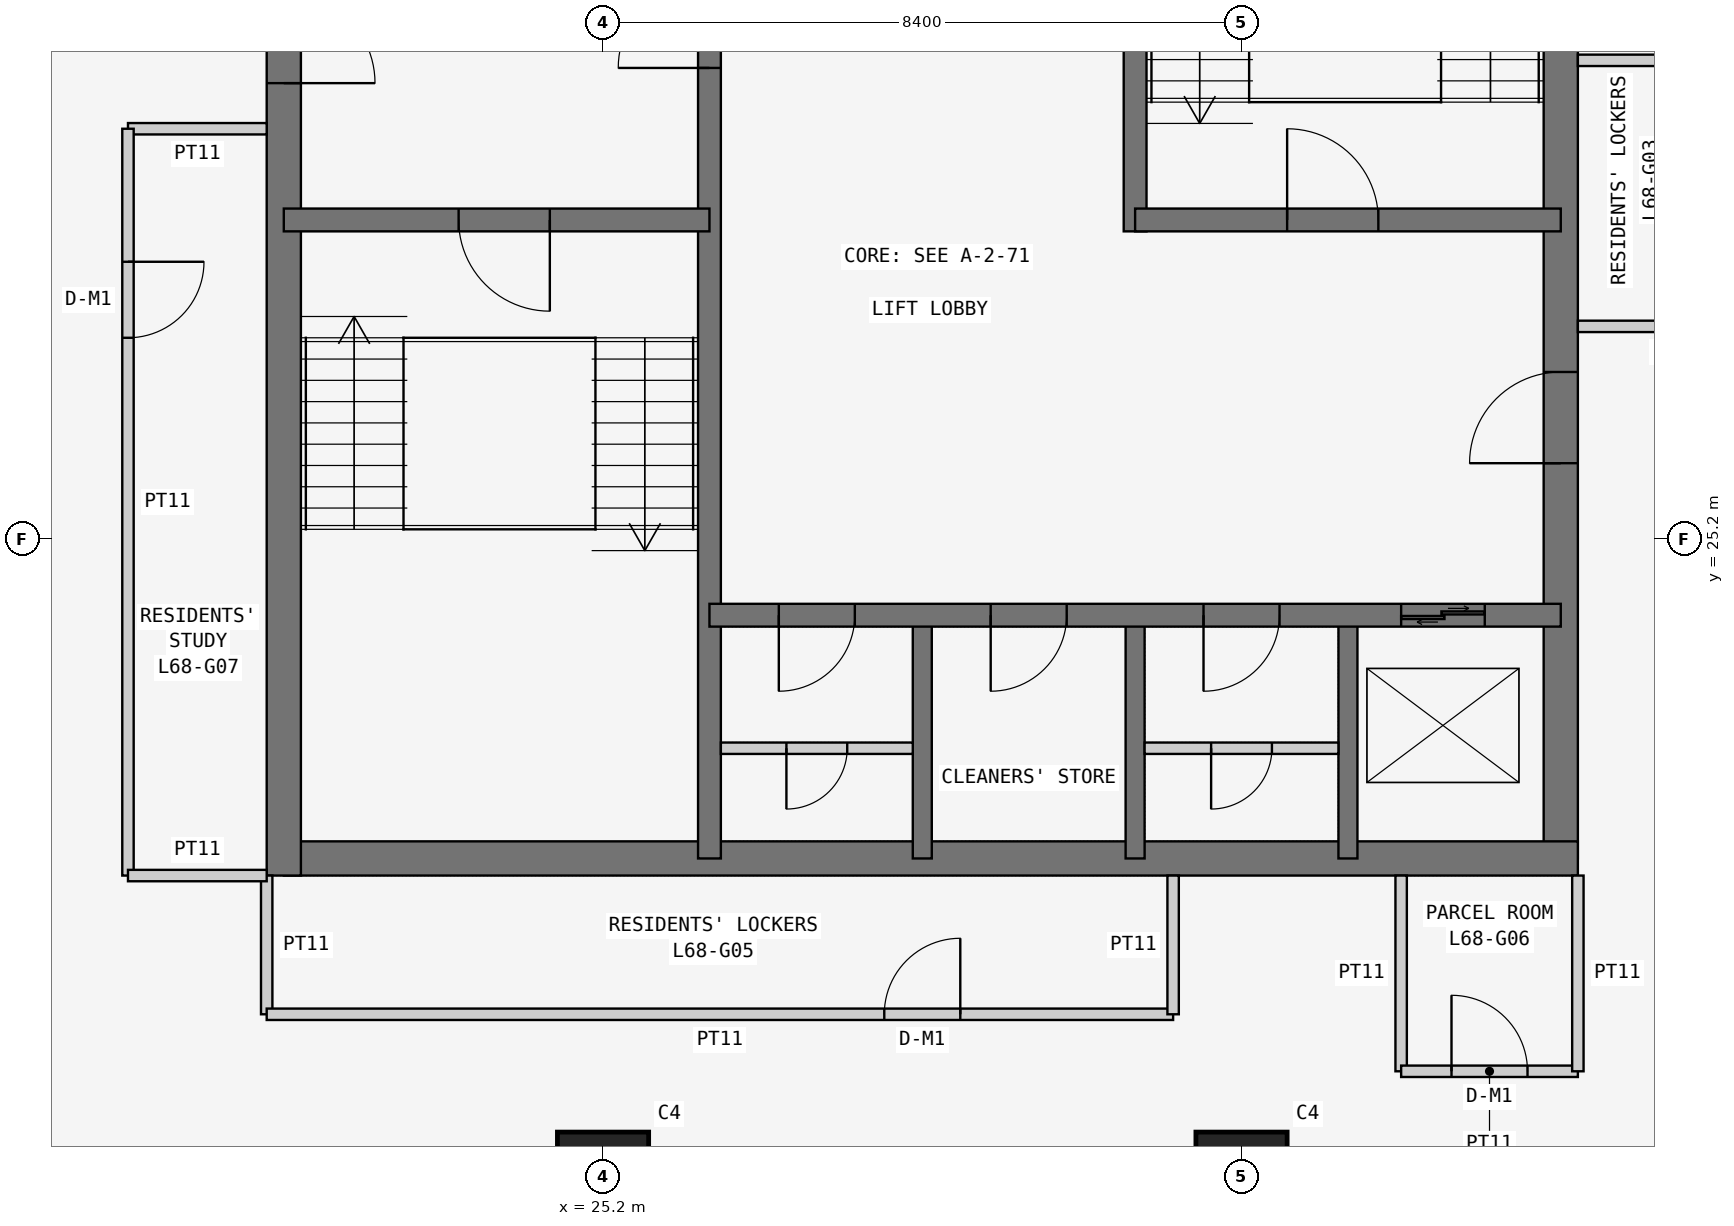
"""IFC4 building model, lengths in metres.
Left out: names, types, materials, properties, quantities, classifications, styles, units other than length and angle.
Written with IfcOpenShell. Run it as: python <this file> out.ifc"""

import sys

from ifc_helpers import new_model, si_unit, direction, frame, frame_2d, origin, origin_2d, place, context, subcontext, project, spatial, rectangle, extrude, element, fill, save


model = new_model("IFC4")
c1 = context("Model", 3, precision=1e-05, world=origin(), true_north=direction((0.0, 1.0)))
c2 = subcontext(c1, "Body", "Model", "MODEL_VIEW")
j1 = project(units=[si_unit("LENGTHUNIT", "METRE"), si_unit("PLANEANGLEUNIT", "RADIAN")], contexts=[c1])
p1 = place(None, origin())
s1 = spatial("IfcSite", under=j1, at=p1, CompositionType="ELEMENT")
p2 = place(p1, origin())
s2 = spatial("IfcBuilding", under=s1, at=p2, CompositionType="ELEMENT")
p3 = place(p2, frame((0.0, 0.0, 261.3)))
s3 = spatial("IfcBuildingStorey", under=s2, at=p3, CompositionType="ELEMENT", Elevation=261.3)
for number, where, z_axis, x_axis in (
    (1, (25.2, 16.8, 0.0), (0.0, 0.0, 1.0), (1.0, 0.0, 0.0)),
    (2, (33.6, 16.8, 0.0), (0.0, 0.0, 1.0), (1.0, 0.0, 0.0)),
):
    element("IfcColumn", number, at=place(p3, frame(where, z_axis=z_axis, x_axis=x_axis)), inside=s3, PredefinedType="COLUMN", context=c2, shape_type="SweptSolid", body=[
        extrude(rectangle(XDim=1.2, YDim=1.2, at=origin_2d()), origin(), (0.0, 0.0, 1.0), 3.6),
    ])
p4 = place(p3, frame((21.0, 21.0, 0.0), z_axis=(0.0, 0.0, 1.0), x_axis=(1.0, 0.0, 0.0)))
e3 = element("IfcWall", 3, at=p4, inside=s3, PredefinedType="SHEAR", context=c2, shape_type="SweptSolid", body=[
    extrude(rectangle(XDim=17.025, YDim=0.45, at=frame_2d((8.512, 0.0))), origin(), (0.0, 0.0, 1.0), 3.6),
])
p5 = place(p3, frame((37.8, 21.0, 0.0), z_axis=(0.0, 0.0, 1.0), x_axis=(0.0, 1.0, 0.0)))
e4 = element("IfcWall", 4, at=p5, inside=s3, PredefinedType="SHEAR", context=c2, shape_type="SweptSolid", body=[
    extrude(rectangle(XDim=17.025, YDim=0.45, at=frame_2d((8.512, 0.0))), origin(), (0.0, 0.0, 1.0), 3.6),
])
p6 = place(p5, frame((5.2, 0.0, 0.0)))
e5 = element("IfcOpeningElement", 5, at=p6, cuts=e4, PredefinedType="OPENING", context=c2, shape_type="SweptSolid", body=[
    extrude(rectangle(XDim=1.2, YDim=2.1, at=frame_2d((0.6, 1.05))), frame((0.0, 0.235, 0.0), z_axis=(0.0, -1.0, 0.0), x_axis=(1.0, 0.0, 0.0)), (0.0, 0.0, 1.0), 0.47),
])
p7 = place(p3, frame((21.0, 37.8, 0.0), z_axis=(0.0, 0.0, 1.0), x_axis=(0.0, -1.0, 0.0)))
e6 = element("IfcWall", 6, at=p7, inside=s3, PredefinedType="SHEAR", context=c2, shape_type="SweptSolid", body=[
    extrude(rectangle(XDim=17.025, YDim=0.45, at=frame_2d((8.513, 0.0))), origin(), (0.0, 0.0, 1.0), 3.6),
])
p8 = place(p7, frame((5.4, 0.0, 0.0)))
e7 = element("IfcOpeningElement", 7, at=p8, cuts=e6, PredefinedType="OPENING", context=c2, shape_type="SweptSolid", body=[
    extrude(rectangle(XDim=1.2, YDim=2.1, at=frame_2d((0.6, 1.05))), frame((0.0, 0.235, 0.0), z_axis=(0.0, -1.0, 0.0), x_axis=(1.0, 0.0, 0.0)), (0.0, 0.0, 1.0), 0.47),
])
p9 = place(p3, frame((26.6, 21.0, 0.0), z_axis=(0.0, 0.0, 1.0), x_axis=(0.0, 1.0, 0.0)))
e8 = element("IfcWall", 8, at=p9, inside=s3, PredefinedType="SHEAR", context=c2, shape_type="SweptSolid", body=[
    extrude(rectangle(XDim=16.8, YDim=0.3, at=frame_2d((8.4, 0.0))), origin(), (0.0, 0.0, 1.0), 3.6),
])
p10 = place(p9, frame((10.4, 0.0, 0.0)))
e9 = element("IfcOpeningElement", 9, at=p10, cuts=e8, PredefinedType="OPENING", context=c2, shape_type="SweptSolid", body=[
    extrude(rectangle(XDim=1.2, YDim=2.1, at=frame_2d((0.6, 1.05))), frame((0.0, 0.16, 0.0), z_axis=(0.0, -1.0, 0.0), x_axis=(1.0, 0.0, 0.0)), (0.0, 0.0, 1.0), 0.32),
])
p11 = place(p3, frame((21.0, 29.4, 0.0), z_axis=(0.0, 0.0, 1.0), x_axis=(1.0, 0.0, 0.0)))
e10 = element("IfcWall", 10, at=p11, inside=s3, PredefinedType="SHEAR", context=c2, shape_type="SweptSolid", body=[
    extrude(rectangle(XDim=5.6, YDim=0.3, at=frame_2d((2.8, 0.0))), origin(), (0.0, 0.0, 1.0), 3.6),
])
p12 = place(p11, frame((2.3, 0.0, 0.0)))
e11 = element("IfcOpeningElement", 11, at=p12, cuts=e10, PredefinedType="OPENING", context=c2, shape_type="SweptSolid", body=[
    extrude(rectangle(XDim=1.2, YDim=2.1, at=frame_2d((0.6, 1.05))), frame((0.0, 0.16, 0.0), z_axis=(0.0, -1.0, 0.0), x_axis=(1.0, 0.0, 0.0)), (0.0, 0.0, 1.0), 0.32),
])
p13 = place(p3, frame((26.6, 24.2, 0.0), z_axis=(0.0, 0.0, 1.0), x_axis=(1.0, 0.0, 0.0)))
e12 = element("IfcWall", 12, at=p13, inside=s3, PredefinedType="SHEAR", context=c2, shape_type="SweptSolid", body=[
    extrude(rectangle(XDim=11.2, YDim=0.3, at=frame_2d((5.6, 0.0))), origin(), (0.0, 0.0, 1.0), 3.6),
])
p14 = place(p13, frame((0.913, 0.0, 0.0)))
e13 = element("IfcOpeningElement", 13, at=p14, cuts=e12, PredefinedType="OPENING", context=c2, shape_type="SweptSolid", body=[
    extrude(rectangle(XDim=1.0, YDim=2.1, at=frame_2d((0.5, 1.05))), frame((0.0, 0.16, 0.0), z_axis=(0.0, -1.0, 0.0), x_axis=(1.0, 0.0, 0.0)), (0.0, 0.0, 1.0), 0.32),
])
p15 = place(p13, frame((3.7, 0.0, 0.0)))
e14 = element("IfcOpeningElement", 14, at=p15, cuts=e12, PredefinedType="OPENING", context=c2, shape_type="SweptSolid", body=[
    extrude(rectangle(XDim=1.0, YDim=2.1, at=frame_2d((0.5, 1.05))), frame((0.0, 0.16, 0.0), z_axis=(0.0, -1.0, 0.0), x_axis=(1.0, 0.0, 0.0)), (0.0, 0.0, 1.0), 0.32),
])
p16 = place(p13, frame((6.5, 0.0, 0.0)))
e15 = element("IfcOpeningElement", 15, at=p16, cuts=e12, PredefinedType="OPENING", context=c2, shape_type="SweptSolid", body=[
    extrude(rectangle(XDim=1.0, YDim=2.1, at=frame_2d((0.5, 1.05))), frame((0.0, 0.16, 0.0), z_axis=(0.0, -1.0, 0.0), x_axis=(1.0, 0.0, 0.0)), (0.0, 0.0, 1.0), 0.32),
])
p17 = place(p13, frame((9.1, 0.0, 0.0)))
e16 = element("IfcOpeningElement", 16, at=p17, cuts=e12, PredefinedType="OPENING", context=c2, shape_type="SweptSolid", body=[
    extrude(rectangle(XDim=1.1, YDim=2.1, at=frame_2d((0.55, 1.05))), frame((0.0, 0.16, 0.0), z_axis=(0.0, -1.0, 0.0), x_axis=(1.0, 0.0, 0.0)), (0.0, 0.0, 1.0), 0.32),
])
p18 = place(p3, frame((32.2, 29.25, 0.0), z_axis=(0.0, 0.0, 1.0), x_axis=(0.0, 1.0, 0.0)))
e17 = element("IfcWall", 17, at=p18, inside=s3, PredefinedType="SHEAR", context=c2, shape_type="SweptSolid", body=[
    extrude(rectangle(XDim=8.55, YDim=0.3, at=frame_2d((4.275, 0.0))), origin(), (0.0, 0.0, 1.0), 3.6),
])
p19 = place(p3, frame((32.2, 29.4, 0.0), z_axis=(0.0, 0.0, 1.0), x_axis=(1.0, 0.0, 0.0)))
e18 = element("IfcWall", 18, at=p19, inside=s3, PredefinedType="SHEAR", context=c2, shape_type="SweptSolid", body=[
    extrude(rectangle(XDim=5.6, YDim=0.3, at=frame_2d((2.8, 0.0))), origin(), (0.0, 0.0, 1.0), 3.6),
])
p20 = place(p19, frame((2.0, 0.0, 0.0)))
e19 = element("IfcOpeningElement", 19, at=p20, cuts=e18, PredefinedType="OPENING", context=c2, shape_type="SweptSolid", body=[
    extrude(rectangle(XDim=1.2, YDim=2.1, at=frame_2d((0.6, 1.05))), frame((0.0, 0.16, 0.0), z_axis=(0.0, -1.0, 0.0), x_axis=(1.0, 0.0, 0.0)), (0.0, 0.0, 1.0), 0.32),
])
for number, where, z_axis, x_axis in (
    (20, (29.4, 21.0, 0.0), (0.0, 0.0, 1.0), (0.0, 1.0, 0.0)),
    (21, (32.2, 21.0, 0.0), (0.0, 0.0, 1.0), (0.0, 1.0, 0.0)),
    (22, (35.0, 21.0, 0.0), (0.0, 0.0, 1.0), (0.0, 1.0, 0.0)),
):
    element("IfcWall", number, at=place(p3, frame(where, z_axis=z_axis, x_axis=x_axis)), inside=s3, PredefinedType="SHEAR", context=c2, shape_type="SweptSolid", body=[
        extrude(rectangle(XDim=3.2, YDim=0.25, at=frame_2d((1.6, 0.0))), origin(), (0.0, 0.0, 1.0), 3.6),
    ])
for number, where, z_axis, x_axis in (
    (23, (38.025, 28.0, 0.0), (0.0, 0.0, 1.0), (1.0, 0.0, 0.0)),
    (24, (40.6, 31.5, 0.0), (0.0, 0.0, 1.0), (-1.0, 0.0, 0.0)),
):
    element("IfcWall", number, at=place(p3, frame(where, z_axis=z_axis, x_axis=x_axis)), inside=s3, PredefinedType="PARTITIONING", context=c2, shape_type="SweptSolid", body=[
        extrude(rectangle(XDim=2.575, YDim=0.15, at=frame_2d((1.288, 0.0))), origin(), (0.0, 0.0, 1.0), 3.45),
    ])
p21 = place(p3, frame((20.775, 20.775, 0.0), z_axis=(0.0, 0.0, 1.0), x_axis=(0.0, -1.0, 0.0)))
e25 = element("IfcWall", 25, at=p21, inside=s3, PredefinedType="PARTITIONING", context=c2, shape_type="SweptSolid", body=[
    extrude(rectangle(XDim=1.825, YDim=0.15, at=frame_2d((0.913, 0.0))), origin(), (0.0, 0.0, 1.0), 3.45),
])
p22 = place(p3, frame((20.775, 18.95, 0.0), z_axis=(0.0, 0.0, 1.0), x_axis=(1.0, 0.0, 0.0)))
e26 = element("IfcWall", 26, at=p22, inside=s3, PredefinedType="PARTITIONING", context=c2, shape_type="SweptSolid", body=[
    extrude(rectangle(XDim=11.925, YDim=0.15, at=frame_2d((5.962, 0.0))), origin(), (0.0, 0.0, 1.0), 3.45),
])
p23 = place(p22, frame((8.125, 0.0, 0.0)))
e27 = element("IfcOpeningElement", 27, at=p23, cuts=e26, PredefinedType="OPENING", context=c2, shape_type="SweptSolid", body=[
    extrude(rectangle(XDim=1.0, YDim=2.1, at=frame_2d((0.5, 1.05))), frame((0.0, 0.085, 0.0), z_axis=(0.0, -1.0, 0.0), x_axis=(1.0, 0.0, 0.0)), (0.0, 0.0, 1.0), 0.17),
])
p24 = place(p3, frame((32.7, 18.95, 0.0), z_axis=(0.0, 0.0, 1.0), x_axis=(0.0, 1.0, 0.0)))
e28 = element("IfcWall", 28, at=p24, inside=s3, PredefinedType="PARTITIONING", context=c2, shape_type="SweptSolid", body=[
    extrude(rectangle(XDim=1.825, YDim=0.15, at=frame_2d((0.913, 0.0))), origin(), (0.0, 0.0, 1.0), 3.45),
])
p25 = place(p3, frame((35.7, 20.775, 0.0), z_axis=(0.0, 0.0, 1.0), x_axis=(0.0, -1.0, 0.0)))
e29 = element("IfcWall", 29, at=p25, inside=s3, PredefinedType="PARTITIONING", context=c2, shape_type="SweptSolid", body=[
    extrude(rectangle(XDim=2.575, YDim=0.15, at=frame_2d((1.288, 0.0))), origin(), (0.0, 0.0, 1.0), 3.45),
])
p26 = place(p3, frame((35.7, 18.2, 0.0), z_axis=(0.0, 0.0, 1.0), x_axis=(1.0, 0.0, 0.0)))
e30 = element("IfcWall", 30, at=p26, inside=s3, PredefinedType="PARTITIONING", context=c2, shape_type="SweptSolid", body=[
    extrude(rectangle(XDim=2.325, YDim=0.15, at=frame_2d((1.163, 0.0))), origin(), (0.0, 0.0, 1.0), 3.45),
])
p27 = place(p26, frame((0.663, 0.0, 0.0)))
e31 = element("IfcOpeningElement", 31, at=p27, cuts=e30, PredefinedType="OPENING", context=c2, shape_type="SweptSolid", body=[
    extrude(rectangle(XDim=1.0, YDim=2.1, at=frame_2d((0.5, 1.05))), frame((0.0, 0.085, 0.0), z_axis=(0.0, -1.0, 0.0), x_axis=(1.0, 0.0, 0.0)), (0.0, 0.0, 1.0), 0.17),
])
p28 = place(p3, frame((38.025, 18.2, 0.0), z_axis=(0.0, 0.0, 1.0), x_axis=(0.0, 1.0, 0.0)))
e32 = element("IfcWall", 32, at=p28, inside=s3, PredefinedType="PARTITIONING", context=c2, shape_type="SweptSolid", body=[
    extrude(rectangle(XDim=2.575, YDim=0.15, at=frame_2d((1.288, 0.0))), origin(), (0.0, 0.0, 1.0), 3.45),
])
p29 = place(p3, frame((20.775, 30.6, 0.0), z_axis=(0.0, 0.0, 1.0), x_axis=(-1.0, 0.0, 0.0)))
e33 = element("IfcWall", 33, at=p29, inside=s3, PredefinedType="PARTITIONING", context=c2, shape_type="SweptSolid", body=[
    extrude(rectangle(XDim=1.825, YDim=0.15, at=frame_2d((0.913, 0.0))), origin(), (0.0, 0.0, 1.0), 3.45),
])
p30 = place(p3, frame((18.95, 30.6, 0.0), z_axis=(0.0, 0.0, 1.0), x_axis=(0.0, -1.0, 0.0)))
e34 = element("IfcWall", 34, at=p30, inside=s3, PredefinedType="PARTITIONING", context=c2, shape_type="SweptSolid", body=[
    extrude(rectangle(XDim=9.825, YDim=0.15, at=frame_2d((4.913, 0.0))), origin(), (0.0, 0.0, 1.0), 3.45),
])
p31 = place(p30, frame((1.75, 0.0, 0.0)))
e35 = element("IfcOpeningElement", 35, at=p31, cuts=e34, PredefinedType="OPENING", context=c2, shape_type="SweptSolid", body=[
    extrude(rectangle(XDim=1.0, YDim=2.1, at=frame_2d((0.5, 1.05))), frame((0.0, 0.085, 0.0), z_axis=(0.0, -1.0, 0.0), x_axis=(1.0, 0.0, 0.0)), (0.0, 0.0, 1.0), 0.17),
])
p32 = place(p3, frame((18.95, 20.775, 0.0), z_axis=(0.0, 0.0, 1.0), x_axis=(1.0, 0.0, 0.0)))
e36 = element("IfcWall", 36, at=p32, inside=s3, PredefinedType="PARTITIONING", context=c2, shape_type="SweptSolid", body=[
    extrude(rectangle(XDim=1.825, YDim=0.15, at=frame_2d((0.913, 0.0))), origin(), (0.0, 0.0, 1.0), 3.45),
])
p33 = place(p3, frame((26.75, 22.45, 0.0), z_axis=(0.0, 0.0, 1.0), x_axis=(1.0, 0.0, 0.0)))
e37 = element("IfcWall", 37, at=p33, inside=s3, PredefinedType="PARTITIONING", context=c2, shape_type="SweptSolid", body=[
    extrude(rectangle(XDim=2.525, YDim=0.15, at=frame_2d((1.262, 0.0))), origin(), (0.0, 0.0, 1.0), 3.45),
])
p34 = place(p33, frame((0.863, 0.0, 0.0)))
e38 = element("IfcOpeningElement", 38, at=p34, cuts=e37, PredefinedType="OPENING", context=c2, shape_type="SweptSolid", body=[
    extrude(rectangle(XDim=0.8, YDim=2.1, at=frame_2d((0.4, 1.05))), frame((0.0, 0.085, 0.0), z_axis=(0.0, -1.0, 0.0), x_axis=(1.0, 0.0, 0.0)), (0.0, 0.0, 1.0), 0.17),
])
p35 = place(p3, frame((32.325, 22.45, 0.0), z_axis=(0.0, 0.0, 1.0), x_axis=(1.0, 0.0, 0.0)))
e39 = element("IfcWall", 39, at=p35, inside=s3, PredefinedType="PARTITIONING", context=c2, shape_type="SweptSolid", body=[
    extrude(rectangle(XDim=2.55, YDim=0.15, at=frame_2d((1.275, 0.0))), origin(), (0.0, 0.0, 1.0), 3.45),
])
p36 = place(p35, frame((0.875, 0.0, 0.0)))
e40 = element("IfcOpeningElement", 40, at=p36, cuts=e39, PredefinedType="OPENING", context=c2, shape_type="SweptSolid", body=[
    extrude(rectangle(XDim=0.8, YDim=2.1, at=frame_2d((0.4, 1.05))), frame((0.0, 0.085, 0.0), z_axis=(0.0, -1.0, 0.0), x_axis=(1.0, 0.0, 0.0)), (0.0, 0.0, 1.0), 0.17),
])
p37 = place(p23, origin())
e41 = element("IfcDoor", 41, at=p37, inside=s3, OperationType="SINGLE_SWING_RIGHT", PredefinedType="DOOR", context=c2, shape_type="SweptSolid", body=[
    extrude(rectangle(XDim=1.0, YDim=2.1, at=frame_2d((0.5, 1.05))), frame((0.0, 0.025, 0.0), z_axis=(0.0, -1.0, 0.0), x_axis=(1.0, 0.0, 0.0)), (0.0, 0.0, 1.0), 0.05),
])
fill(e27, e41)
p38 = place(p27, origin())
e42 = element("IfcDoor", 42, at=p38, inside=s3, OperationType="SINGLE_SWING_LEFT", PredefinedType="DOOR", context=c2, shape_type="SweptSolid", body=[
    extrude(rectangle(XDim=1.0, YDim=2.1, at=frame_2d((0.5, 1.05))), frame((0.0, 0.025, 0.0), z_axis=(0.0, -1.0, 0.0), x_axis=(1.0, 0.0, 0.0)), (0.0, 0.0, 1.0), 0.05),
])
fill(e31, e42)
p39 = place(p31, origin())
e43 = element("IfcDoor", 43, at=p39, inside=s3, OperationType="SINGLE_SWING_LEFT", PredefinedType="DOOR", context=c2, shape_type="SweptSolid", body=[
    extrude(rectangle(XDim=1.0, YDim=2.1, at=frame_2d((0.5, 1.05))), frame((0.0, 0.025, 0.0), z_axis=(0.0, -1.0, 0.0), x_axis=(1.0, 0.0, 0.0)), (0.0, 0.0, 1.0), 0.05),
])
fill(e35, e43)
p40 = place(p8, origin())
e44 = element("IfcDoor", 44, at=p40, inside=s3, OperationType="SINGLE_SWING_RIGHT", PredefinedType="DOOR", context=c2, shape_type="SweptSolid", body=[
    extrude(rectangle(XDim=1.2, YDim=2.1, at=frame_2d((0.6, 1.05))), frame((0.0, 0.025, 0.0), z_axis=(0.0, -1.0, 0.0), x_axis=(1.0, 0.0, 0.0)), (0.0, 0.0, 1.0), 0.05),
])
fill(e7, e44)
p41 = place(p12, frame((1.2, 0.0, 0.0), z_axis=(0.0, 0.0, 1.0), x_axis=(-1.0, 0.0, 0.0)))
e45 = element("IfcDoor", 45, at=p41, inside=s3, OperationType="SINGLE_SWING_LEFT", PredefinedType="DOOR", context=c2, shape_type="SweptSolid", body=[
    extrude(rectangle(XDim=1.2, YDim=2.1, at=frame_2d((0.6, 1.05))), frame((0.0, 0.025, 0.0), z_axis=(0.0, -1.0, 0.0), x_axis=(1.0, 0.0, 0.0)), (0.0, 0.0, 1.0), 0.05),
])
fill(e11, e45)
p42 = place(p10, origin())
e46 = element("IfcDoor", 46, at=p42, inside=s3, OperationType="SINGLE_SWING_LEFT", PredefinedType="DOOR", context=c2, shape_type="SweptSolid", body=[
    extrude(rectangle(XDim=1.2, YDim=2.1, at=frame_2d((0.6, 1.05))), frame((0.0, 0.025, 0.0), z_axis=(0.0, -1.0, 0.0), x_axis=(1.0, 0.0, 0.0)), (0.0, 0.0, 1.0), 0.05),
])
fill(e9, e46)
p43 = place(p6, origin())
e47 = element("IfcDoor", 47, at=p43, inside=s3, OperationType="SINGLE_SWING_LEFT", PredefinedType="DOOR", context=c2, shape_type="SweptSolid", body=[
    extrude(rectangle(XDim=1.2, YDim=2.1, at=frame_2d((0.6, 1.05))), frame((0.0, 0.025, 0.0), z_axis=(0.0, -1.0, 0.0), x_axis=(1.0, 0.0, 0.0)), (0.0, 0.0, 1.0), 0.05),
])
fill(e5, e47)
p44 = place(p20, origin())
e48 = element("IfcDoor", 48, at=p44, inside=s3, OperationType="SINGLE_SWING_LEFT", PredefinedType="DOOR", context=c2, shape_type="SweptSolid", body=[
    extrude(rectangle(XDim=1.2, YDim=2.1, at=frame_2d((0.6, 1.05))), frame((0.0, 0.025, 0.0), z_axis=(0.0, -1.0, 0.0), x_axis=(1.0, 0.0, 0.0)), (0.0, 0.0, 1.0), 0.05),
])
fill(e19, e48)
p45 = place(p14, frame((1.0, 0.0, 0.0), z_axis=(0.0, 0.0, 1.0), x_axis=(-1.0, 0.0, 0.0)))
e49 = element("IfcDoor", 49, at=p45, inside=s3, OperationType="SINGLE_SWING_RIGHT", PredefinedType="DOOR", context=c2, shape_type="SweptSolid", body=[
    extrude(rectangle(XDim=1.0, YDim=2.1, at=frame_2d((0.5, 1.05))), frame((0.0, 0.025, 0.0), z_axis=(0.0, -1.0, 0.0), x_axis=(1.0, 0.0, 0.0)), (0.0, 0.0, 1.0), 0.05),
])
fill(e13, e49)
p46 = place(p34, frame((0.8, 0.0, 0.0), z_axis=(0.0, 0.0, 1.0), x_axis=(-1.0, 0.0, 0.0)))
e50 = element("IfcDoor", 50, at=p46, inside=s3, OperationType="SINGLE_SWING_RIGHT", PredefinedType="DOOR", context=c2, shape_type="SweptSolid", body=[
    extrude(rectangle(XDim=0.8, YDim=2.1, at=frame_2d((0.4, 1.05))), frame((0.0, 0.025, 0.0), z_axis=(0.0, -1.0, 0.0), x_axis=(1.0, 0.0, 0.0)), (0.0, 0.0, 1.0), 0.05),
])
fill(e38, e50)
p47 = place(p15, frame((1.0, 0.0, 0.0), z_axis=(0.0, 0.0, 1.0), x_axis=(-1.0, 0.0, 0.0)))
e51 = element("IfcDoor", 51, at=p47, inside=s3, OperationType="SINGLE_SWING_RIGHT", PredefinedType="DOOR", context=c2, shape_type="SweptSolid", body=[
    extrude(rectangle(XDim=1.0, YDim=2.1, at=frame_2d((0.5, 1.05))), frame((0.0, 0.025, 0.0), z_axis=(0.0, -1.0, 0.0), x_axis=(1.0, 0.0, 0.0)), (0.0, 0.0, 1.0), 0.05),
])
fill(e14, e51)
p48 = place(p16, frame((1.0, 0.0, 0.0), z_axis=(0.0, 0.0, 1.0), x_axis=(-1.0, 0.0, 0.0)))
e52 = element("IfcDoor", 52, at=p48, inside=s3, OperationType="SINGLE_SWING_RIGHT", PredefinedType="DOOR", context=c2, shape_type="SweptSolid", body=[
    extrude(rectangle(XDim=1.0, YDim=2.1, at=frame_2d((0.5, 1.05))), frame((0.0, 0.025, 0.0), z_axis=(0.0, -1.0, 0.0), x_axis=(1.0, 0.0, 0.0)), (0.0, 0.0, 1.0), 0.05),
])
fill(e15, e52)
p49 = place(p36, frame((0.8, 0.0, 0.0), z_axis=(0.0, 0.0, 1.0), x_axis=(-1.0, 0.0, 0.0)))
e53 = element("IfcDoor", 53, at=p49, inside=s3, OperationType="SINGLE_SWING_RIGHT", PredefinedType="DOOR", context=c2, shape_type="SweptSolid", body=[
    extrude(rectangle(XDim=0.8, YDim=2.1, at=frame_2d((0.4, 1.05))), frame((0.0, 0.025, 0.0), z_axis=(0.0, -1.0, 0.0), x_axis=(1.0, 0.0, 0.0)), (0.0, 0.0, 1.0), 0.05),
])
fill(e40, e53)
p50 = place(p17, origin())
e54 = element("IfcDoor", 54, at=p50, inside=s3, OperationType="DOUBLE_DOOR_SLIDING", PredefinedType="DOOR", context=c2, shape_type="SweptSolid", body=[
    extrude(rectangle(XDim=1.1, YDim=2.1, at=frame_2d((0.55, 1.05))), frame((0.0, 0.025, 0.0), z_axis=(0.0, -1.0, 0.0), x_axis=(1.0, 0.0, 0.0)), (0.0, 0.0, 1.0), 0.05),
])
fill(e16, e54)
save(model, sys.argv[1])
